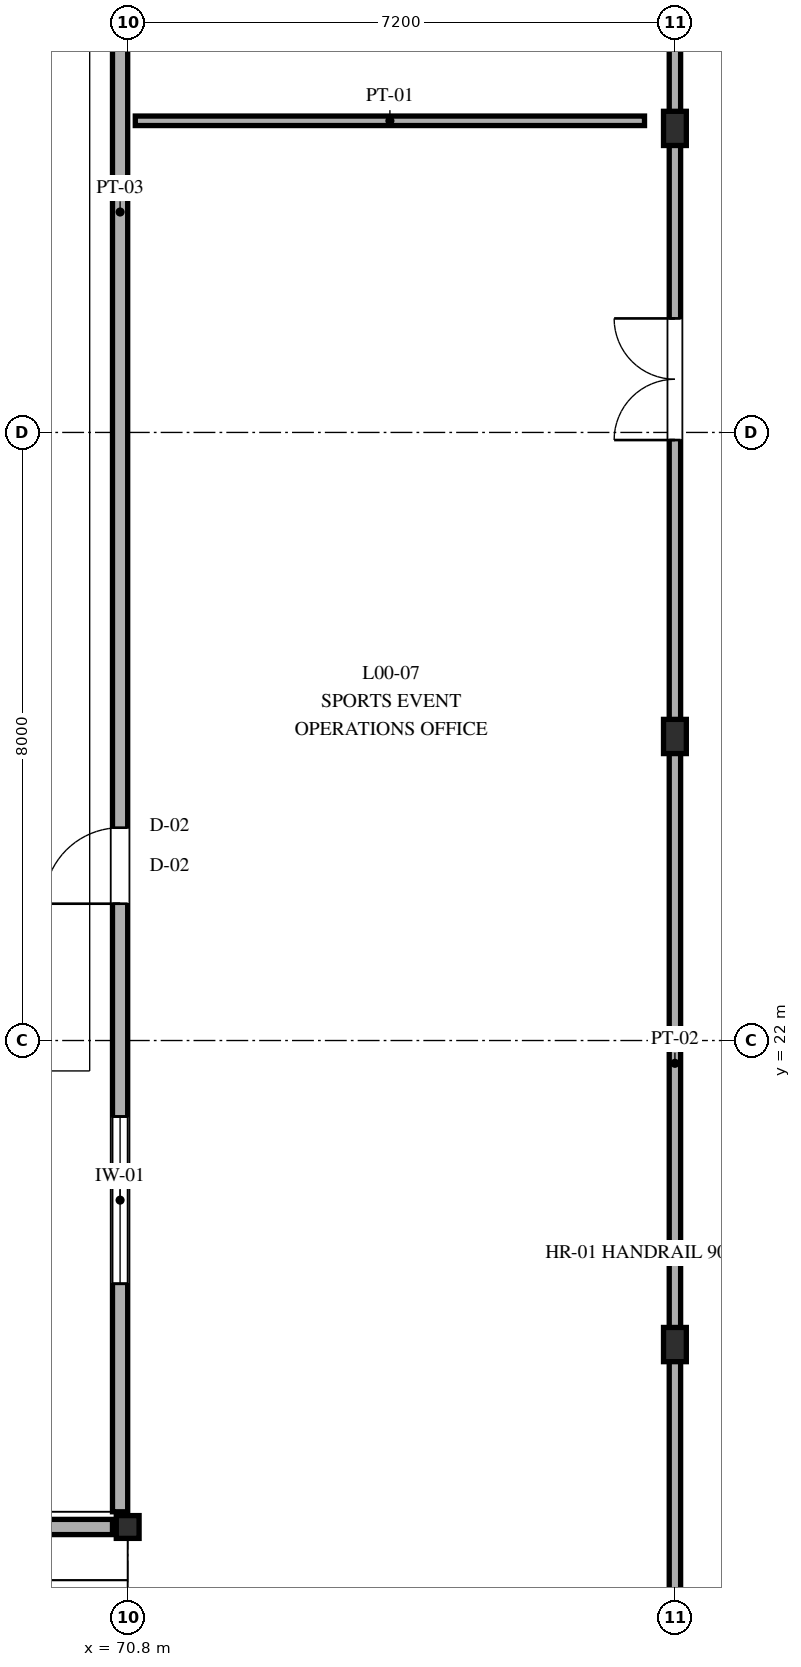
"""IFC4 building model, lengths in metres.
Left out: names, types, materials, properties, quantities, classifications, styles, units other than length and angle.
Written with IfcOpenShell. Run it as: python <this file> out.ifc"""

import sys

from ifc_helpers import new_model, si_unit, direction, frame, frame_2d, origin, origin_2d, place, context, subcontext, project, spatial, rectangle, i_section, extrude, element, fill, save


model = new_model("IFC4")
c1 = context("Model", 3, precision=1e-05, world=origin(), true_north=direction((0.0, 1.0)))
c2 = subcontext(c1, "Body", "Model", "MODEL_VIEW")
j1 = project(units=[si_unit("LENGTHUNIT", "METRE"), si_unit("PLANEANGLEUNIT", "RADIAN")], contexts=[c1])
p1 = place(None, origin())
s1 = spatial("IfcSite", under=j1, at=p1, CompositionType="ELEMENT")
p2 = place(p1, origin())
s2 = spatial("IfcBuilding", under=s1, at=p2, CompositionType="ELEMENT")
p3 = place(p2, origin())
s3 = spatial("IfcBuildingStorey", under=s2, at=p3, CompositionType="ELEMENT", Elevation=0.0)
for number, where, z_axis, x_axis in (
    (1, (78.0, 18.0, 0.0), (0.0, 0.0, 1.0), (1.0, 0.0, 0.0)),
    (2, (78.0, 26.0, 0.0), (0.0, 0.0, 1.0), (1.0, 0.0, 0.0)),
    (3, (78.0, 34.0, 0.0), (0.0, 0.0, 1.0), (1.0, 0.0, 0.0)),
):
    element("IfcColumn", number, at=place(p3, frame(where, z_axis=z_axis, x_axis=x_axis)), inside=s3, PredefinedType="COLUMN", context=c2, shape_type="SweptSolid", body=[
        extrude(i_section(OverallWidth=0.3, OverallDepth=0.45, WebThickness=0.014, FlangeThickness=0.026, FilletRadius=0.027, at=origin_2d()), origin(), (0.0, 0.0, 1.0), 4.8),
    ])
p4 = place(p3, frame((70.8, 15.6, 0.0), z_axis=(0.0, 0.0, 1.0), x_axis=(1.0, 0.0, 0.0)))
e4 = element("IfcColumn", 4, at=p4, inside=s3, PredefinedType="COLUMN", context=c2, shape_type="SweptSolid", body=[
    extrude(i_section(OverallWidth=0.3, OverallDepth=0.3, WebThickness=0.011, FlangeThickness=0.019, FilletRadius=0.027, at=origin_2d()), origin(), (0.0, 0.0, 1.0), 4.8),
])
p5 = place(p3, frame((16.2, 15.6, 0.0), z_axis=(0.0, 0.0, 1.0), x_axis=(1.0, 0.0, 0.0)))
e5 = element("IfcWall", 5, at=p5, inside=s3, PredefinedType="PARTITIONING", context=c2, shape_type="SweptSolid", body=[
    extrude(rectangle(XDim=54.4, YDim=0.2, at=frame_2d((27.2, 0.0))), origin(), (0.0, 0.0, 1.0), 4.1),
])
p6 = place(p5, frame((6.5, 0.0, 0.0)))
e6 = element("IfcOpeningElement", 6, at=p6, cuts=e5, PredefinedType="OPENING", context=c2, shape_type="SweptSolid", body=[
    extrude(rectangle(XDim=1.6, YDim=2.2, at=frame_2d((0.8, 1.1))), frame((0.0, 0.11, 0.0), z_axis=(0.0, -1.0, 0.0), x_axis=(1.0, 0.0, 0.0)), (0.0, 0.0, 1.0), 0.22),
])
p7 = place(p5, frame((27.0, 0.0, 0.0)))
e7 = element("IfcOpeningElement", 7, at=p7, cuts=e5, PredefinedType="OPENING", context=c2, shape_type="SweptSolid", body=[
    extrude(rectangle(XDim=1.6, YDim=2.2, at=frame_2d((0.8, 1.1))), frame((0.0, 0.11, 0.0), z_axis=(0.0, -1.0, 0.0), x_axis=(1.0, 0.0, 0.0)), (0.0, 0.0, 1.0), 0.22),
])
p8 = place(p5, frame((48.0, 0.0, 0.0)))
e8 = element("IfcOpeningElement", 8, at=p8, cuts=e5, PredefinedType="OPENING", context=c2, shape_type="SweptSolid", body=[
    extrude(rectangle(XDim=1.6, YDim=2.2, at=frame_2d((0.8, 1.1))), frame((0.0, 0.11, 0.0), z_axis=(0.0, -1.0, 0.0), x_axis=(1.0, 0.0, 0.0)), (0.0, 0.0, 1.0), 0.22),
])
p9 = place(p5, frame((15.0, 0.0, 1.05)))
e9 = element("IfcOpeningElement", 9, at=p9, cuts=e5, PredefinedType="OPENING", context=c2, shape_type="SweptSolid", body=[
    extrude(rectangle(XDim=3.0, YDim=1.5, at=frame_2d((1.5, 0.75))), frame((0.0, 0.11, 0.0), z_axis=(0.0, -1.0, 0.0), x_axis=(1.0, 0.0, 0.0)), (0.0, 0.0, 1.0), 0.22),
])
p10 = place(p3, frame((70.7, 15.8, 0.0), z_axis=(0.0, 0.0, 1.0), x_axis=(0.0, 1.0, 0.0)))
e10 = element("IfcWall", 10, at=p10, inside=s3, PredefinedType="PARTITIONING", context=c2, shape_type="SweptSolid", body=[
    extrude(rectangle(XDim=37.8, YDim=0.2, at=frame_2d((18.9, 0.0))), origin(), (0.0, 0.0, 1.0), 4.1),
])
p11 = place(p10, frame((8.0, 0.0, 0.0)))
e11 = element("IfcOpeningElement", 11, at=p11, cuts=e10, PredefinedType="OPENING", context=c2, shape_type="SweptSolid", body=[
    extrude(rectangle(XDim=1.0, YDim=2.15, at=frame_2d((0.5, 1.075))), frame((0.0, 0.11, 0.0), z_axis=(0.0, -1.0, 0.0), x_axis=(1.0, 0.0, 0.0)), (0.0, 0.0, 1.0), 0.22),
])
p12 = place(p10, frame((25.2, 0.0, 0.0)))
e12 = element("IfcOpeningElement", 12, at=p12, cuts=e10, PredefinedType="OPENING", context=c2, shape_type="SweptSolid", body=[
    extrude(rectangle(XDim=1.0, YDim=2.15, at=frame_2d((0.5, 1.075))), frame((0.0, 0.11, 0.0), z_axis=(0.0, -1.0, 0.0), x_axis=(1.0, 0.0, 0.0)), (0.0, 0.0, 1.0), 0.22),
])
p13 = place(p10, frame((3.0, 0.0, 1.05)))
e13 = element("IfcOpeningElement", 13, at=p13, cuts=e10, PredefinedType="OPENING", context=c2, shape_type="SweptSolid", body=[
    extrude(rectangle(XDim=2.2, YDim=1.4, at=frame_2d((1.1, 0.7))), frame((0.0, 0.11, 0.0), z_axis=(0.0, -1.0, 0.0), x_axis=(1.0, 0.0, 0.0)), (0.0, 0.0, 1.0), 0.22),
])
p14 = place(p3, frame((70.9, 34.1, 0.0), z_axis=(0.0, 0.0, 1.0), x_axis=(1.0, 0.0, 0.0)))
e14 = element("IfcWall", 14, at=p14, inside=s3, PredefinedType="PARTITIONING", context=c2, shape_type="SweptSolid", body=[
    extrude(rectangle(XDim=6.7, YDim=0.125, at=frame_2d((3.35, 0.0))), origin(), (0.0, 0.0, 1.0), 4.1),
])
p15 = place(p3, frame((78.0, 9.9, 0.0), z_axis=(0.0, 0.0, 1.0), x_axis=(0.0, 1.0, 0.0)))
e15 = element("IfcWall", 15, at=p15, inside=s3, PredefinedType="PARTITIONING", context=c2, shape_type="SweptSolid", body=[
    extrude(rectangle(XDim=43.7, YDim=0.15, at=frame_2d((21.85, 0.0))), origin(), (0.0, 0.0, 1.0), 3.815),
])
p16 = place(p15, frame((2.0, 0.0, 0.0)))
e16 = element("IfcOpeningElement", 16, at=p16, cuts=e15, PredefinedType="OPENING", context=c2, shape_type="SweptSolid", body=[
    extrude(rectangle(XDim=1.6, YDim=2.2, at=frame_2d((0.8, 1.1))), frame((0.0, 0.085, 0.0), z_axis=(0.0, -1.0, 0.0), x_axis=(1.0, 0.0, 0.0)), (0.0, 0.0, 1.0), 0.17),
])
p17 = place(p15, frame((20.0, 0.0, 0.0)))
e17 = element("IfcOpeningElement", 17, at=p17, cuts=e15, PredefinedType="OPENING", context=c2, shape_type="SweptSolid", body=[
    extrude(rectangle(XDim=1.6, YDim=2.2, at=frame_2d((0.8, 1.1))), frame((0.0, 0.085, 0.0), z_axis=(0.0, -1.0, 0.0), x_axis=(1.0, 0.0, 0.0)), (0.0, 0.0, 1.0), 0.17),
])
p18 = place(p11, origin())
e18 = element("IfcDoor", 18, at=p18, inside=s3, OperationType="SINGLE_SWING_LEFT", PredefinedType="DOOR", context=c2, shape_type="SweptSolid", body=[
    extrude(rectangle(XDim=1.0, YDim=2.15, at=frame_2d((0.5, 1.075))), frame((0.0, 0.025, 0.0), z_axis=(0.0, -1.0, 0.0), x_axis=(1.0, 0.0, 0.0)), (0.0, 0.0, 1.0), 0.05),
])
fill(e11, e18)
p19 = place(p13, origin())
e19 = element("IfcWindow", 19, at=p19, inside=s3, PartitioningType="SINGLE_PANEL", PredefinedType="WINDOW", context=c2, shape_type="SweptSolid", body=[
    extrude(rectangle(XDim=2.2, YDim=1.4, at=frame_2d((1.1, 0.7))), frame((0.0, 0.03, 0.0), z_axis=(0.0, -1.0, 0.0), x_axis=(1.0, 0.0, 0.0)), (0.0, 0.0, 1.0), 0.06),
])
fill(e13, e19)
p20 = place(p17, origin())
e20 = element("IfcDoor", 20, at=p20, inside=s3, OperationType="DOUBLE_DOOR_SINGLE_SWING", PredefinedType="DOOR", context=c2, shape_type="SweptSolid", body=[
    extrude(rectangle(XDim=1.6, YDim=2.2, at=frame_2d((0.8, 1.1))), frame((0.0, 0.025, 0.0), z_axis=(0.0, -1.0, 0.0), x_axis=(1.0, 0.0, 0.0)), (0.0, 0.0, 1.0), 0.05),
])
fill(e17, e20)
save(model, sys.argv[1])
